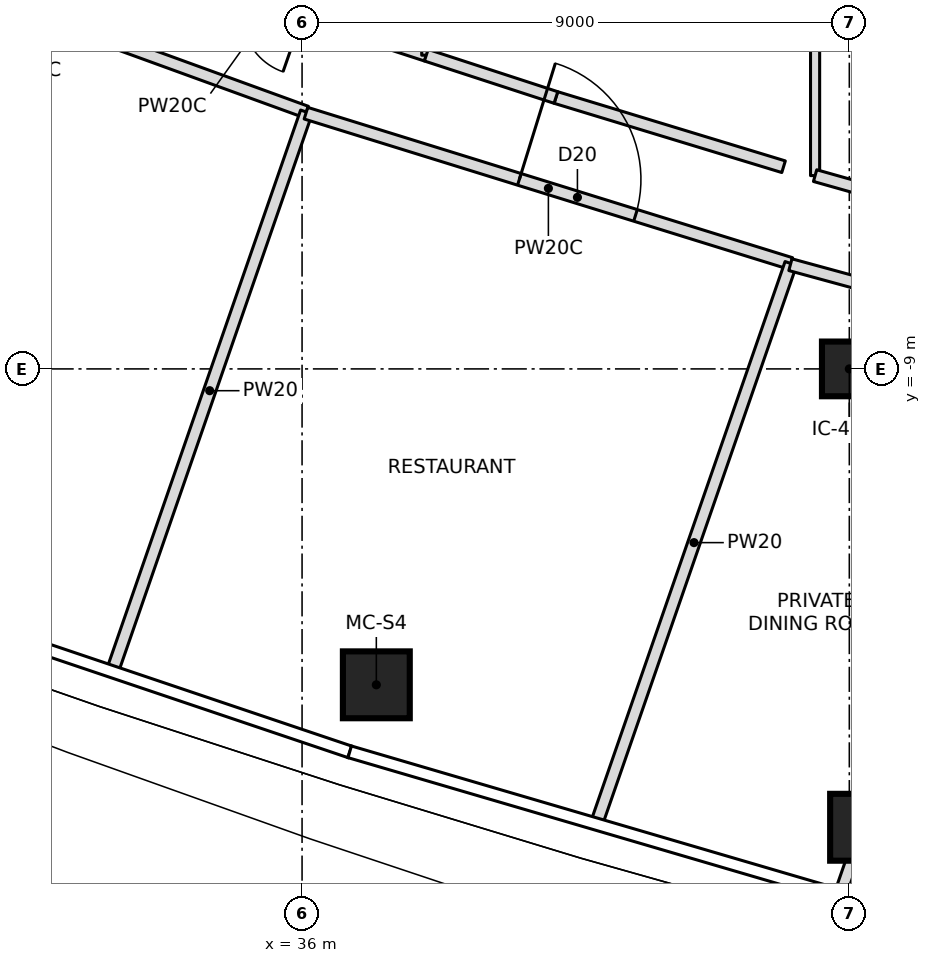
"""IFC4 building model, lengths in metres.
Left out: names, types, materials, properties, quantities, classifications, styles, units other than length and angle.
Written with IfcOpenShell. Run it as: python <this file> out.ifc"""

import sys

from ifc_helpers import new_model, si_unit, direction, frame, frame_2d, origin, origin_2d, place, context, subcontext, project, spatial, rectangle, extrude, element, fill, save


model = new_model("IFC4")
c1 = context("Model", 3, precision=1e-05, world=origin(), true_north=direction((0.0, 1.0)))
c2 = subcontext(c1, "Body", "Model", "MODEL_VIEW")
j1 = project(units=[si_unit("LENGTHUNIT", "METRE"), si_unit("PLANEANGLEUNIT", "RADIAN")], contexts=[c1])
p1 = place(None, origin())
s1 = spatial("IfcSite", under=j1, at=p1, CompositionType="ELEMENT")
p2 = place(p1, origin())
s2 = spatial("IfcBuilding", under=s1, at=p2, CompositionType="ELEMENT")
p3 = place(p2, frame((0.0, 0.0, 263.3)))
s3 = spatial("IfcBuildingStorey", under=s2, at=p3, CompositionType="ELEMENT", Elevation=263.3)
for number, where, z_axis, x_axis in (
    (1, (37.221, -14.196, 0.0), (0.0, 0.0, 1.0), (1.0, 0.0, 0.0)),
    (2, (45.235, -16.539, 0.0), (0.0, 0.0, 1.0), (1.0, 0.0, 0.0)),
):
    element("IfcColumn", number, at=place(p3, frame(where, z_axis=z_axis, x_axis=x_axis)), inside=s3, PredefinedType="COLUMN", context=c2, shape_type="SweptSolid", body=[
        extrude(rectangle(XDim=1.1, YDim=1.1, at=origin_2d()), origin(), (0.0, 0.0, 1.0), 4.6),
    ])
p4 = place(p3, frame((45.0, -9.0, 0.0), z_axis=(0.0, 0.0, 1.0), x_axis=(1.0, 0.0, 0.0)))
e3 = element("IfcColumn", 3, at=p4, inside=s3, PredefinedType="COLUMN", context=c2, shape_type="SweptSolid", body=[
    extrude(rectangle(XDim=0.9, YDim=0.9, at=origin_2d()), origin(), (0.0, 0.0, 1.0), 4.6),
])
p5 = place(p3, frame((26.85, -1.423, 0.0), z_axis=(0.0, 0.0, 1.0), x_axis=(0.939807953272, -0.341703103536, 0.0)))
e4 = element("IfcWall", 4, at=p5, inside=s3, PredefinedType="PARTITIONING", context=c2, shape_type="SweptSolid", body=[
    extrude(rectangle(XDim=9.811, YDim=0.2, at=frame_2d((4.906, 0.0))), origin(), (0.0, 0.0, 1.0), 4.3),
])
p6 = place(p5, frame((4.406, 0.0, 0.0)))
e5 = element("IfcOpeningElement", 5, at=p6, cuts=e4, PredefinedType="OPENING", context=c2, shape_type="SweptSolid", body=[
    extrude(rectangle(XDim=2.0, YDim=2.4, at=frame_2d((1.0, 1.2))), frame((0.0, 0.11, 0.0), z_axis=(0.0, -1.0, 0.0), x_axis=(1.0, 0.0, 0.0)), (0.0, 0.0, 1.0), 0.22),
])
p7 = place(p3, frame((32.891, -13.941, 0.0), z_axis=(0.0, 0.0, 1.0), x_axis=(0.327725028322, 0.94477315045, 0.0)))
e6 = element("IfcWall", 6, at=p7, inside=s3, PredefinedType="PARTITIONING", context=c2, shape_type="SweptSolid", body=[
    extrude(rectangle(XDim=9.702, YDim=0.2, at=frame_2d((4.851, 0.0))), origin(), (0.0, 0.0, 1.0), 4.3),
])
p8 = place(p3, frame((36.064, -4.794, 0.0), z_axis=(0.0, 0.0, 1.0), x_axis=(0.955129200503, -0.296189483855, 0.0)))
e7 = element("IfcWall", 7, at=p8, inside=s3, PredefinedType="PARTITIONING", context=c2, shape_type="SweptSolid", body=[
    extrude(rectangle(XDim=8.348, YDim=0.2, at=frame_2d((4.174, 0.0))), origin(), (0.0, 0.0, 1.0), 4.3),
])
p9 = place(p8, frame((3.674, 0.0, 0.0)))
e8 = element("IfcOpeningElement", 8, at=p9, cuts=e7, PredefinedType="OPENING", context=c2, shape_type="SweptSolid", body=[
    extrude(rectangle(XDim=2.0, YDim=2.4, at=frame_2d((1.0, 1.2))), frame((0.0, 0.11, 0.0), z_axis=(0.0, -1.0, 0.0), x_axis=(1.0, 0.0, 0.0)), (0.0, 0.0, 1.0), 0.22),
])
p10 = place(p3, frame((40.854, -16.447, 0.0), z_axis=(0.0, 0.0, 1.0), x_axis=(0.327714576096, 0.944776776077, 0.0)))
e9 = element("IfcWall", 9, at=p10, inside=s3, PredefinedType="PARTITIONING", context=c2, shape_type="SweptSolid", body=[
    extrude(rectangle(XDim=9.717, YDim=0.2, at=frame_2d((4.858, 0.0))), origin(), (0.0, 0.0, 1.0), 4.3),
])
p11 = place(p3, frame((44.031, -7.286, 0.0), z_axis=(0.0, 0.0, 1.0), x_axis=(0.964708521199, -0.263320088726, 0.0)))
e10 = element("IfcWall", 10, at=p11, inside=s3, PredefinedType="PARTITIONING", context=c2, shape_type="SweptSolid", body=[
    extrude(rectangle(XDim=4.179, YDim=0.2, at=frame_2d((2.089, 0.0))), origin(), (0.0, 0.0, 1.0), 4.3),
])
p12 = place(p11, frame((1.8, 0.0, 0.0)))
e11 = element("IfcOpeningElement", 11, at=p12, cuts=e10, PredefinedType="OPENING", context=c2, shape_type="SweptSolid", body=[
    extrude(rectangle(XDim=1.0, YDim=2.1, at=frame_2d((0.5, 1.05))), frame((0.0, 0.11, 0.0), z_axis=(0.0, -1.0, 0.0), x_axis=(1.0, 0.0, 0.0)), (0.0, 0.0, 1.0), 0.22),
])
p13 = place(p3, frame((44.874, -17.579, 0.0), z_axis=(0.0, 0.0, 1.0), x_axis=(0.327705598625, 0.944779890043, 0.0)))
e12 = element("IfcWall", 12, at=p13, inside=s3, PredefinedType="PARTITIONING", context=c2, shape_type="SweptSolid", body=[
    extrude(rectangle(XDim=9.61, YDim=0.2, at=frame_2d((4.805, 0.0))), origin(), (0.0, 0.0, 1.0), 4.3),
])
p14 = place(p3, frame((38.043, -3.841, 0.0), z_axis=(0.0, 0.0, 1.0), x_axis=(-0.950695184954, 0.31012685357, 0.0)))
e13 = element("IfcWall", 13, at=p14, inside=s3, PredefinedType="PARTITIONING", context=c2, shape_type="SweptSolid", body=[
    extrude(rectangle(XDim=1.67, YDim=0.2, at=frame_2d((0.835, 0.0))), origin(), (0.0, 0.0, 1.0), 4.3),
])
p15 = place(p3, frame((38.043, -3.841, 0.0), z_axis=(0.0, 0.0, 1.0), x_axis=(0.0, 1.0, 0.0)))
e14 = element("IfcWall", 14, at=p15, inside=s3, PredefinedType="PARTITIONING", context=c2, shape_type="SweptSolid", body=[
    extrude(rectangle(XDim=7.682, YDim=0.15, at=frame_2d((3.841, 0.0))), origin(), (0.0, 0.0, 1.0), 4.3),
])
p16 = place(p3, frame((43.918, -5.675, 0.0), z_axis=(0.0, 0.0, 1.0), x_axis=(-0.956723737069, 0.29099775073, 0.0)))
e15 = element("IfcWall", 15, at=p16, inside=s3, PredefinedType="PARTITIONING", context=c2, shape_type="SweptSolid", body=[
    extrude(rectangle(XDim=3.913, YDim=0.2, at=frame_2d((1.957, 0.0))), origin(), (0.0, 0.0, 1.0), 4.3),
])
p17 = place(p3, frame((40.175, -4.536, 0.0), z_axis=(0.0, 0.0, 1.0), x_axis=(-0.950720770841, 0.310048408949, 0.0)))
e16 = element("IfcWall", 16, at=p17, inside=s3, PredefinedType="PARTITIONING", context=c2, shape_type="SweptSolid", body=[
    extrude(rectangle(XDim=2.243, YDim=0.2, at=frame_2d((1.121, 0.0))), origin(), (0.0, 0.0, 1.0), 4.3),
])
p18 = place(p3, frame((44.437, -5.821, 0.0), z_axis=(0.0, 0.0, 1.0), x_axis=(0.0, 1.0, 0.0)))
e17 = element("IfcWall", 17, at=p18, inside=s3, PredefinedType="PARTITIONING", context=c2, shape_type="SweptSolid", body=[
    extrude(rectangle(XDim=11.642, YDim=0.15, at=frame_2d((5.821, 0.0))), origin(), (0.0, 0.0, 1.0), 4.3),
])
p19 = place(p3, frame((47.684, -6.738, 0.0), z_axis=(0.0, 0.0, 1.0), x_axis=(-0.962403613575, 0.271623424206, 0.0)))
e18 = element("IfcWall", 18, at=p19, inside=s3, PredefinedType="PARTITIONING", context=c2, shape_type="SweptSolid", body=[
    extrude(rectangle(XDim=3.374, YDim=0.2, at=frame_2d((1.687, 0.0))), origin(), (0.0, 0.0, 1.0), 4.3),
])
p20 = place(p19, frame((1.187, 0.0, 0.0)))
e19 = element("IfcOpeningElement", 19, at=p20, cuts=e18, PredefinedType="OPENING", context=c2, shape_type="SweptSolid", body=[
    extrude(rectangle(XDim=1.0, YDim=2.1, at=frame_2d((0.5, 1.05))), frame((0.0, 0.11, 0.0), z_axis=(0.0, -1.0, 0.0), x_axis=(1.0, 0.0, 0.0)), (0.0, 0.0, 1.0), 0.22),
])
p21 = place(p9, origin())
e20 = element("IfcDoor", 20, at=p21, inside=s3, OperationType="DOUBLE_DOOR_SINGLE_SWING", PredefinedType="DOOR", context=c2, shape_type="SweptSolid", body=[
    extrude(rectangle(XDim=2.0, YDim=2.4, at=frame_2d((1.0, 1.2))), frame((0.0, 0.025, 0.0), z_axis=(0.0, -1.0, 0.0), x_axis=(1.0, 0.0, 0.0)), (0.0, 0.0, 1.0), 0.05),
])
fill(e8, e20)
save(model, sys.argv[1])
